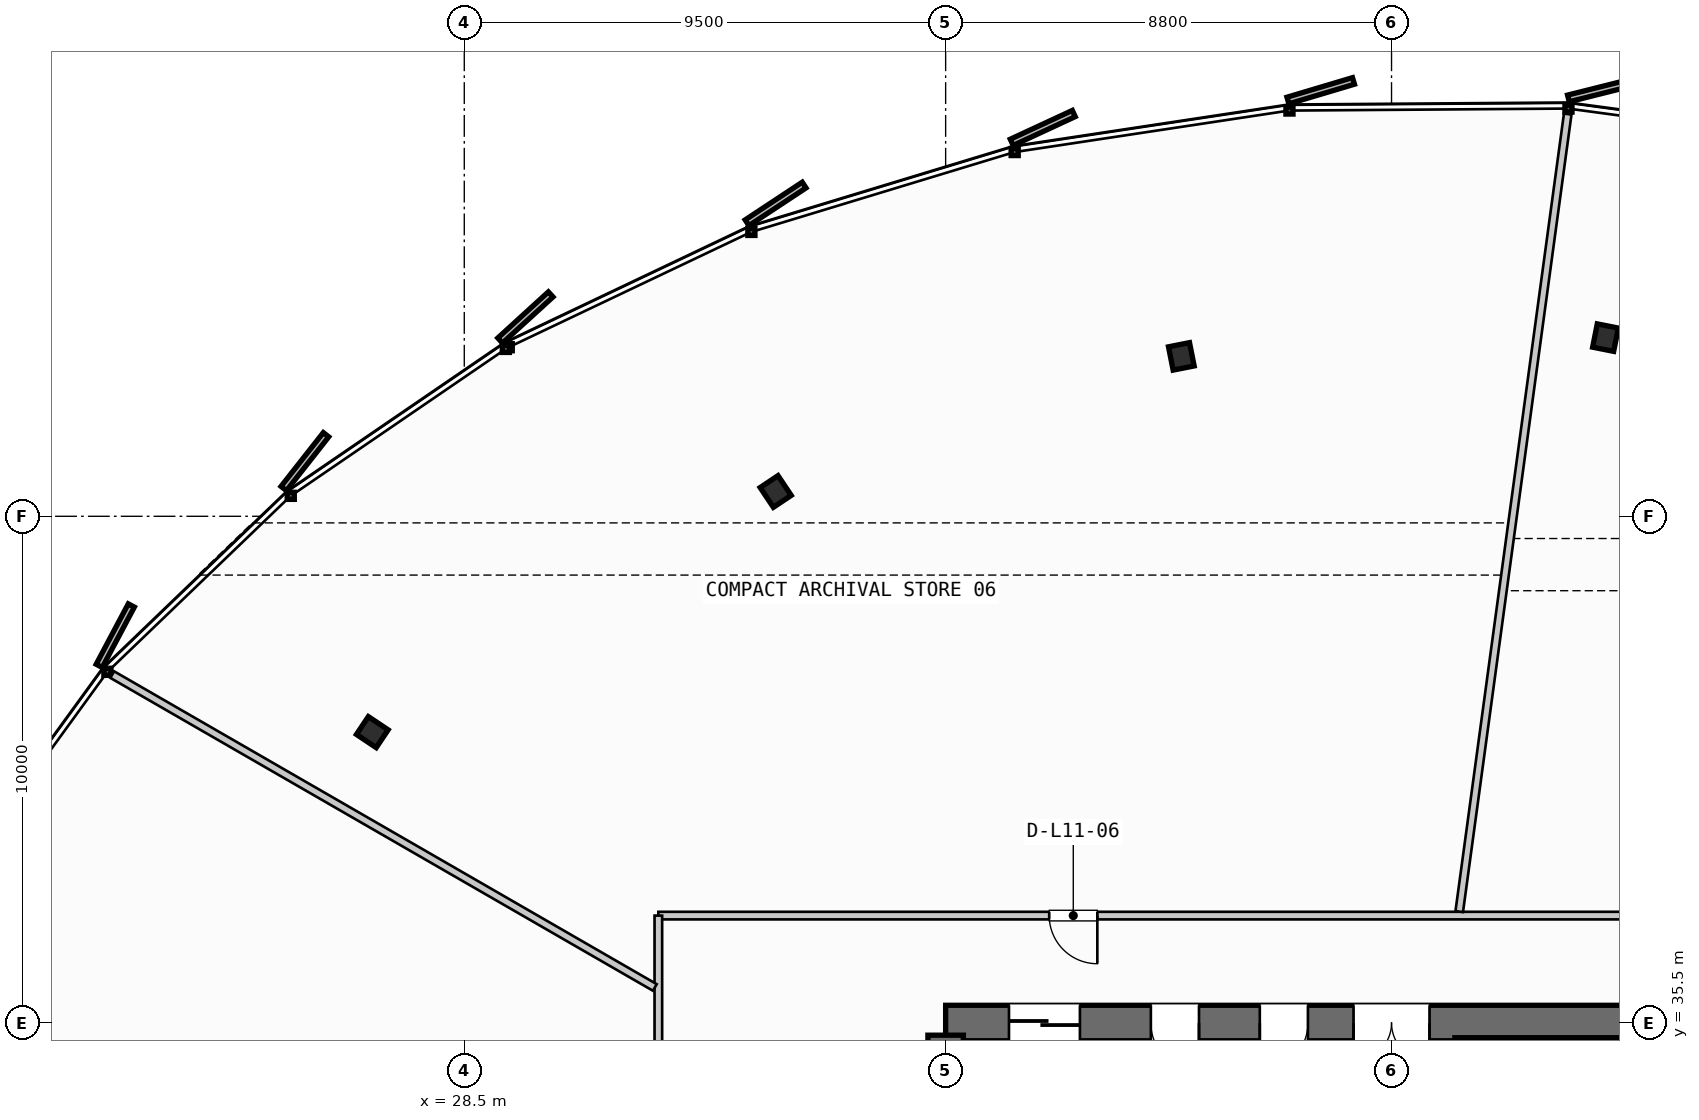
"""IFC4 building model, lengths in metres.
Left out: names, types, materials, properties, quantities, classifications, styles, units other than length and angle.
Written with IfcOpenShell. Run it as: python <this file> out.ifc"""

import sys

from ifc_helpers import new_model, si_unit, direction, frame, frame_2d, origin, origin_2d, place, context, subcontext, project, spatial, rectangle, i_section, extrude, source, transform, mapped, element, fill, save


model = new_model("IFC4")
c1 = context("Model", 3, precision=1e-05, world=origin(), true_north=direction((0.0, 1.0)))
c2 = subcontext(c1, "Body", "Model", "MODEL_VIEW")
j1 = project(units=[si_unit("LENGTHUNIT", "METRE"), si_unit("PLANEANGLEUNIT", "RADIAN")], contexts=[c1])
p1 = place(None, origin())
s1 = spatial("IfcSite", under=j1, at=p1, CompositionType="ELEMENT")
p2 = place(p1, origin())
s2 = spatial("IfcBuilding", under=s1, at=p2, CompositionType="ELEMENT")
p3 = place(p2, frame((0.0, 0.0, 48.6)))
s3 = spatial("IfcBuildingStorey", under=s2, at=p3, CompositionType="ELEMENT", Elevation=48.6)
p4 = place(p3, frame((55.6, 35.5, 0.0), z_axis=(0.0, 0.0, 1.0), x_axis=(-1.0, 0.0, 0.0)))
e1 = element("IfcWall", 1, at=p4, inside=s3, PredefinedType="SHEAR", context=c2, shape_type="SweptSolid", body=[
    extrude(rectangle(XDim=17.6, YDim=0.7, at=frame_2d((8.8, 0.0))), origin(), (0.0, 0.0, 1.0), 3.55),
])
p5 = place(p4, frame((8.05, 0.0, 0.0)))
e2 = element("IfcOpeningElement", 2, at=p5, cuts=e1, PredefinedType="OPENING", context=c2, shape_type="SweptSolid", body=[
    extrude(rectangle(XDim=1.5, YDim=2.2, at=frame_2d((0.75, 1.1))), frame((0.0, 0.36, 0.0), z_axis=(0.0, -1.0, 0.0), x_axis=(1.0, 0.0, 0.0)), (0.0, 0.0, 1.0), 0.72),
])
p6 = place(p4, frame((14.95, 0.0, 0.0)))
e3 = element("IfcOpeningElement", 3, at=p6, cuts=e1, PredefinedType="OPENING", context=c2, shape_type="SweptSolid", body=[
    extrude(rectangle(XDim=1.4, YDim=2.3, at=frame_2d((0.7, 1.15))), frame((0.0, 0.36, 0.0), z_axis=(0.0, -1.0, 0.0), x_axis=(1.0, 0.0, 0.0)), (0.0, 0.0, 1.0), 0.72),
])
p7 = place(p4, frame((12.6, 0.0, 0.0)))
e4 = element("IfcOpeningElement", 4, at=p7, cuts=e1, PredefinedType="OPENING", context=c2, shape_type="SweptSolid", body=[
    extrude(rectangle(XDim=0.95, YDim=2.15, at=frame_2d((0.475, 1.075))), frame((0.0, 0.36, 0.0), z_axis=(0.0, -1.0, 0.0), x_axis=(1.0, 0.0, 0.0)), (0.0, 0.0, 1.0), 0.72),
])
p8 = place(p4, frame((10.45, 0.0, 0.0)))
e5 = element("IfcOpeningElement", 5, at=p8, cuts=e1, PredefinedType="OPENING", context=c2, shape_type="SweptSolid", body=[
    extrude(rectangle(XDim=0.95, YDim=2.15, at=frame_2d((0.475, 1.075))), frame((0.0, 0.36, 0.0), z_axis=(0.0, -1.0, 0.0), x_axis=(1.0, 0.0, 0.0)), (0.0, 0.0, 1.0), 0.72),
])
p9 = place(p3, frame((38.0, 35.26, 0.0), z_axis=(0.0, 0.0, 1.0), x_axis=(0.0, -1.0, 0.0)))
e6 = element("IfcWall", 6, at=p9, inside=s3, PredefinedType="SHEAR", context=c2, shape_type="SweptSolid", body=[
    extrude(rectangle(XDim=14.92, YDim=0.7, at=frame_2d((7.46, 0.0))), origin(), (0.0, 0.0, 1.0), 3.55),
])
p10 = place(p9, frame((5.21, 0.0, 0.0)))
e7 = element("IfcOpeningElement", 7, at=p10, cuts=e6, PredefinedType="OPENING", context=c2, shape_type="SweptSolid", body=[
    extrude(rectangle(XDim=1.1, YDim=2.2, at=frame_2d((0.55, 1.1))), frame((0.0, 0.36, 0.0), z_axis=(0.0, -1.0, 0.0), x_axis=(1.0, 0.0, 0.0)), (0.0, 0.0, 1.0), 0.72),
])
m1 = source(origin(), c2, "Body", "SweptSolid", [
    extrude(i_section(OverallWidth=0.423, OverallDepth=0.469, WebThickness=0.051, FlangeThickness=0.081, FilletRadius=0.015, at=origin_2d()), origin(), (0.0, 0.0, 1.0), 3.55),
])
for number, where, z_axis, x_axis in (
    (8, (51.022, 49.026, 0.0), (0.0, 0.0, 1.0), (0.195, 0.981, 0.0)),
    (9, (42.652, 48.656, 0.0), (0.0, 0.0, 1.0), (-0.195, 0.981, 0.0)),
    (10, (34.646, 45.99, 0.0), (0.0, 0.0, 1.0), (-0.556, 0.831, 0.0)),
    (11, (26.685, 41.241, 0.0), (0.0, 0.0, 1.0), (-0.831, 0.556, 0.0)),
):
    element("IfcColumn", number, at=place(p3, frame(where, z_axis=z_axis, x_axis=x_axis)), inside=s3, PredefinedType="COLUMN", context=c2, shape_type="MappedRepresentation", body=[
        mapped(m1, transform((0.0, 0.0, 0.0), scale=1.0)),
    ])
p11 = place(p3, frame((48.05, 35.11, 0.0), z_axis=(0.0, 0.0, 1.0), x_axis=(1.0, 0.0, 0.0)))
e12 = element("IfcWall", 12, at=p11, inside=s3, PredefinedType="SHEAR", context=c2, shape_type="SweptSolid", body=[
    extrude(rectangle(XDim=7.35, YDim=0.2, at=frame_2d((3.675, 0.0))), origin(), (0.0, 0.0, 1.0), 3.55),
])
p12 = place(p3, frame((62.83, 37.62, 0.0), z_axis=(0.0, 0.0, 1.0), x_axis=(-1.0, 0.0, 0.0)))
e13 = element("IfcWall", 13, at=p12, inside=s3, PredefinedType="PARTITIONING", context=c2, shape_type="SweptSolid", body=[
    extrude(rectangle(XDim=30.5, YDim=0.15, at=frame_2d((15.25, 0.0))), origin(), (0.0, 0.0, 1.0), 2.785),
])
p13 = place(p12, frame((7.167, 0.0, 0.0)))
e14 = element("IfcOpeningElement", 14, at=p13, cuts=e13, PredefinedType="OPENING", context=c2, shape_type="SweptSolid", body=[
    extrude(rectangle(XDim=0.95, YDim=2.15, at=frame_2d((0.475, 1.075))), frame((0.0, 0.085, 0.0), z_axis=(0.0, -1.0, 0.0), x_axis=(1.0, 0.0, 0.0)), (0.0, 0.0, 1.0), 0.17),
])
p14 = place(p12, frame((21.836, 0.0, 0.0)))
e15 = element("IfcOpeningElement", 15, at=p14, cuts=e13, PredefinedType="OPENING", context=c2, shape_type="SweptSolid", body=[
    extrude(rectangle(XDim=0.95, YDim=2.15, at=frame_2d((0.475, 1.075))), frame((0.0, 0.085, 0.0), z_axis=(0.0, -1.0, 0.0), x_axis=(1.0, 0.0, 0.0)), (0.0, 0.0, 1.0), 0.17),
])
p15 = place(p3, frame((32.33, 37.62, 0.0), z_axis=(0.0, 0.0, 1.0), x_axis=(0.0, -1.0, 0.0)))
e16 = element("IfcWall", 16, at=p15, inside=s3, PredefinedType="PARTITIONING", context=c2, shape_type="SweptSolid", body=[
    extrude(rectangle(XDim=20.48, YDim=0.15, at=frame_2d((10.24, 0.0))), origin(), (0.0, 0.0, 1.0), 2.785),
])
p16 = place(p15, frame((10.182, 0.0, 0.0)))
e17 = element("IfcOpeningElement", 17, at=p16, cuts=e16, PredefinedType="OPENING", context=c2, shape_type="SweptSolid", body=[
    extrude(rectangle(XDim=0.95, YDim=2.15, at=frame_2d((0.475, 1.075))), frame((0.0, 0.085, 0.0), z_axis=(0.0, -1.0, 0.0), x_axis=(1.0, 0.0, 0.0)), (0.0, 0.0, 1.0), 0.17),
])
p17 = place(p3, frame((48.136, 37.699, 0.0), z_axis=(0.0, 0.0, 1.0), x_axis=(0.134790121576, 0.990874171187, 0.0)))
e18 = element("IfcWall", 18, at=p17, inside=s3, PredefinedType="PARTITIONING", context=c2, shape_type="SweptSolid", body=[
    extrude(rectangle(XDim=15.883, YDim=0.15, at=frame_2d((7.941, 0.0))), origin(), (0.0, 0.0, 1.0), 2.785),
])
p18 = place(p3, frame((32.261, 36.202, 0.0), z_axis=(0.0, 0.0, 1.0), x_axis=(-0.866322342506, 0.499485333994, 0.0)))
e19 = element("IfcWall", 19, at=p18, inside=s3, PredefinedType="PARTITIONING", context=c2, shape_type="SweptSolid", body=[
    extrude(rectangle(XDim=12.361, YDim=0.15, at=frame_2d((6.18, 0.0))), origin(), (0.0, 0.0, 1.0), 2.785),
])
m2 = source(origin(), c2, "Body", "SweptSolid", [
    extrude(rectangle(XDim=1.5, YDim=2.2, at=frame_2d((0.75, 1.1))), frame((0.0, 0.025, 0.0), z_axis=(0.0, -1.0, 0.0), x_axis=(1.0, 0.0, 0.0)), (0.0, 0.0, 1.0), 0.05),
])
p19 = place(p5, origin())
e20 = element("IfcDoor", 20, at=p19, inside=s3, OperationType="DOUBLE_DOOR_SINGLE_SWING", PredefinedType="DOOR", context=c2, shape_type="MappedRepresentation", body=[
    mapped(m2, transform((0.0, 0.0, 0.0), scale=1.0)),
])
fill(e2, e20)
m3 = source(origin(), c2, "Body", "SweptSolid", [
    extrude(rectangle(XDim=1.4, YDim=2.3, at=frame_2d((0.7, 1.15))), frame((0.0, 0.025, 0.0), z_axis=(0.0, -1.0, 0.0), x_axis=(1.0, 0.0, 0.0)), (0.0, 0.0, 1.0), 0.05),
])
p20 = place(p6, origin())
e21 = element("IfcDoor", 21, at=p20, inside=s3, OperationType="SLIDING_TO_RIGHT", PredefinedType="DOOR", context=c2, shape_type="MappedRepresentation", body=[
    mapped(m3, transform((0.0, 0.0, 0.0), scale=1.0)),
])
fill(e3, e21)
m4 = source(origin(), c2, "Body", "SweptSolid", [
    extrude(rectangle(XDim=0.95, YDim=2.15, at=frame_2d((0.475, 1.075))), frame((0.0, 0.025, 0.0), z_axis=(0.0, -1.0, 0.0), x_axis=(1.0, 0.0, 0.0)), (0.0, 0.0, 1.0), 0.05),
])
p21 = place(p7, origin())
e22 = element("IfcDoor", 22, at=p21, inside=s3, OperationType="SINGLE_SWING_LEFT", PredefinedType="DOOR", context=c2, shape_type="MappedRepresentation", body=[
    mapped(m4, transform((0.0, 0.0, 0.0), scale=1.0)),
])
fill(e4, e22)
p22 = place(p8, origin())
e23 = element("IfcDoor", 23, at=p22, inside=s3, OperationType="SINGLE_SWING_RIGHT", PredefinedType="DOOR", context=c2, shape_type="MappedRepresentation", body=[
    mapped(m4, transform((0.0, 0.0, 0.0), scale=1.0)),
])
fill(e5, e23)
p23 = place(p14, origin())
e24 = element("IfcDoor", 24, at=p23, inside=s3, OperationType="SINGLE_SWING_LEFT", PredefinedType="DOOR", context=c2, shape_type="MappedRepresentation", body=[
    mapped(m4, transform((0.0, 0.0, 0.0), scale=1.0)),
])
fill(e15, e24)
save(model, sys.argv[1])
